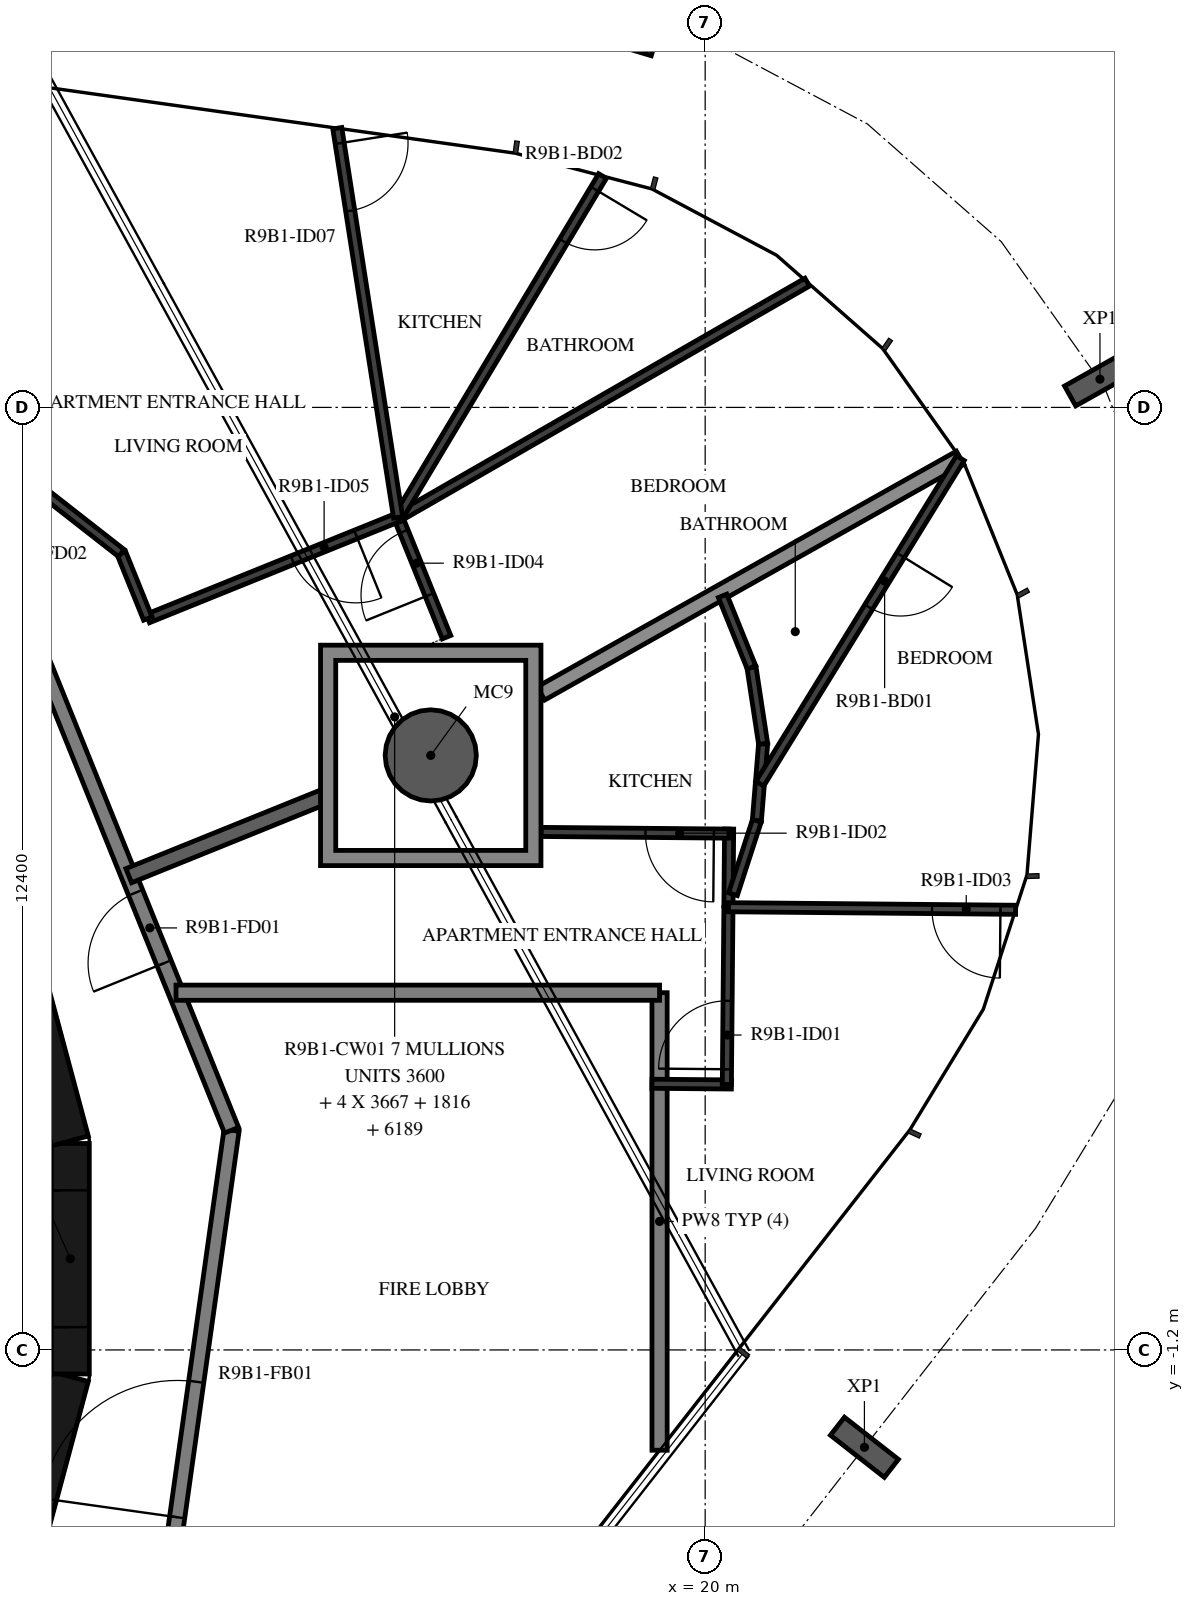
"""IFC4 building model, lengths in metres.
Left out: names, types, materials, properties, quantities, classifications, styles, units other than length and angle.
Written with IfcOpenShell. Run it as: python <this file> out.ifc"""

import sys

from ifc_helpers import new_model, si_unit, direction, frame, frame_2d, origin, origin_2d, place, context, subcontext, project, spatial, polyline, rectangle, hollow_circle, i_section, outline, extrude, element, fill, save


model = new_model("IFC4")
c1 = context("Model", 3, precision=1e-05, world=origin(), true_north=direction((0.0, 1.0)))
c2 = subcontext(c1, "Body", "Model", "MODEL_VIEW")
j1 = project(units=[si_unit("LENGTHUNIT", "METRE"), si_unit("PLANEANGLEUNIT", "RADIAN")], contexts=[c1])
p1 = place(None, origin())
s1 = spatial("IfcSite", under=j1, at=p1, CompositionType="ELEMENT")
p2 = place(p1, origin())
s2 = spatial("IfcBuilding", under=s1, at=p2, CompositionType="ELEMENT")
p3 = place(p2, frame((0.0, 0.0, 350.5)))
s3 = spatial("IfcBuildingStorey", under=s2, at=p3, CompositionType="ELEMENT", Elevation=350.5)
p4 = place(p3, frame((16.39, 6.622, -0.38), z_axis=(0.0, 0.0, 1.0), x_axis=(1.0, 0.0, 0.0)))
e1 = element("IfcColumn", 1, at=p4, inside=s3, PredefinedType="COLUMN", context=c2, shape_type="SweptSolid", body=[
    extrude(hollow_circle(Radius=0.6, WallThickness=0.03, at=origin_2d()), origin(), (0.0, 0.0, 1.0), 3.5),
])
for number, where, z_axis, x_axis in (
    (2, (22.095, -2.481, -0.38), (0.0, 0.0, 1.0), (-0.616, -0.788, 0.0)),
    (3, (25.194, 11.571, -0.38), (0.0, 0.0, 1.0), (0.49, -0.872, 0.0)),
    (4, (19.276, 16.301, -0.38), (0.0, 0.0, 1.0), (0.958, -0.286, 0.0)),
):
    element("IfcColumn", number, at=place(p3, frame(where, z_axis=z_axis, x_axis=x_axis)), inside=s3, PredefinedType="COLUMN", context=c2, shape_type="SweptSolid", body=[
        extrude(i_section(OverallWidth=0.3, OverallDepth=0.9, WebThickness=0.019, FlangeThickness=0.035, FilletRadius=0.03, at=origin_2d()), origin(), (0.0, 0.0, 1.0), 3.5),
    ])
p5 = place(p3, frame((10.858, -4.479, 0.0), z_axis=(0.0, 0.0, 1.0), x_axis=(0.258734743916, 0.965948410781, 0.0)))
e5 = element("IfcWall", 5, at=p5, inside=s3, PredefinedType="SHEAR", context=c2, shape_type="SweptSolid", body=[
    extrude(rectangle(XDim=3.033, YDim=0.5, at=frame_2d((1.516, 0.0))), origin(), (0.0, 0.0, 1.0), 3.12),
])
p6 = place(p3, frame((11.647, -1.516, 0.0), z_axis=(0.0, 0.0, 1.0), x_axis=(0.0, 1.0, 0.0)))
e6 = element("IfcWall", 6, at=p6, inside=s3, PredefinedType="SHEAR", context=c2, shape_type="SweptSolid", body=[
    extrude(rectangle(XDim=3.033, YDim=0.5, at=frame_2d((1.516, 0.0))), origin(), (0.0, 0.0, 1.0), 3.12),
])
p7 = place(p6, frame((0.616, 0.0, 0.0)))
e7 = element("IfcOpeningElement", 7, at=p7, cuts=e6, PredefinedType="OPENING", context=c2, shape_type="SweptSolid", body=[
    extrude(rectangle(XDim=1.8, YDim=2.1, at=frame_2d((0.9, 1.05))), frame((0.0, 0.26, 0.0), z_axis=(0.0, -1.0, 0.0), x_axis=(1.0, 0.0, 0.0)), (0.0, 0.0, 1.0), 0.52),
])
p8 = place(p3, frame((11.643, 1.55, 0.0), z_axis=(0.0, 0.0, 1.0), x_axis=(-0.258734743916, 0.965948410781, 0.0)))
e8 = element("IfcWall", 8, at=p8, inside=s3, PredefinedType="SHEAR", context=c2, shape_type="SweptSolid", body=[
    extrude(rectangle(XDim=3.033, YDim=0.5, at=frame_2d((1.516, 0.0))), origin(), (0.0, 0.0, 1.0), 3.12),
])
p9 = place(p3, frame((12.77, -5.42, 0.0), z_axis=(0.0, 0.0, 1.0), x_axis=(0.139155334385, 0.990270565508, 0.0)))
e9 = element("IfcWall", 9, at=p9, inside=s3, PredefinedType="STANDARD", context=c2, shape_type="SweptSolid", body=[
    extrude(rectangle(XDim=7.181, YDim=0.2, at=frame_2d((3.59, 0.0))), origin(), (0.0, 0.0, 1.0), 3.12),
])
p10 = place(p9, frame((2.039, 0.0, 0.0)))
e10 = element("IfcOpeningElement", 10, at=p10, cuts=e9, PredefinedType="OPENING", context=c2, shape_type="SweptSolid", body=[
    extrude(rectangle(XDim=1.8, YDim=2.1, at=frame_2d((0.9, 1.05))), frame((0.0, 0.11, 0.0), z_axis=(0.0, -1.0, 0.0), x_axis=(1.0, 0.0, 0.0)), (0.0, 0.0, 1.0), 0.22),
])
p11 = place(p3, frame((13.769, 1.691, 0.0), z_axis=(0.0, 0.0, 1.0), x_axis=(-0.374618189599, 0.92717916932, 0.0)))
e11 = element("IfcWall", 11, at=p11, inside=s3, PredefinedType="STANDARD", context=c2, shape_type="SweptSolid", body=[
    extrude(rectangle(XDim=7.181, YDim=0.2, at=frame_2d((3.591, 0.0))), origin(), (0.0, 0.0, 1.0), 3.12),
])
p12 = place(p11, frame((2.371, 0.0, 0.0)))
e12 = element("IfcOpeningElement", 12, at=p12, cuts=e11, PredefinedType="OPENING", context=c2, shape_type="SweptSolid", body=[
    extrude(rectangle(XDim=1.0, YDim=2.1, at=frame_2d((0.5, 1.05))), frame((0.0, 0.11, 0.0), z_axis=(0.0, -1.0, 0.0), x_axis=(1.0, 0.0, 0.0)), (0.0, 0.0, 1.0), 0.22),
])
p13 = place(p3, frame((19.4, -2.519, 0.0), z_axis=(0.0, 0.0, 1.0), x_axis=(0.0, 1.0, 0.0)))
e13 = element("IfcWall", 13, at=p13, inside=s3, PredefinedType="STANDARD", context=c2, shape_type="SweptSolid", body=[
    extrude(rectangle(XDim=6.019, YDim=0.2, at=frame_2d((3.01, 0.0))), origin(), (0.0, 0.0, 1.0), 3.12),
])
p14 = place(p3, frame((19.4, 3.5, 0.0), z_axis=(0.0, 0.0, 1.0), x_axis=(-1.0, 0.0, 0.0)))
e14 = element("IfcWall", 14, at=p14, inside=s3, PredefinedType="STANDARD", context=c2, shape_type="SweptSolid", body=[
    extrude(rectangle(XDim=6.362, YDim=0.2, at=frame_2d((3.181, 0.0))), origin(), (0.0, 0.0, 1.0), 3.12),
])
p15 = place(p3, frame((14.989, 6.079, 0.0), z_axis=(0.0, 0.0, 1.0), x_axis=(-0.927203056473, -0.374559063523, 0.0)))
e15 = element("IfcWall", 15, at=p15, inside=s3, PredefinedType="STANDARD", context=c2, shape_type="SweptSolid", body=[
    extrude(rectangle(XDim=2.775, YDim=0.2, at=frame_2d((1.387, 0.0))), origin(), (0.0, 0.0, 1.0), 3.12),
])
p16 = place(p3, frame((23.354, 10.537, 0.0), z_axis=(0.0, 0.0, 1.0), x_axis=(-0.871719790551, -0.490004700754, 0.0)))
e16 = element("IfcWall", 16, at=p16, inside=s3, PredefinedType="STANDARD", context=c2, shape_type="SweptSolid", body=[
    extrude(rectangle(XDim=6.326, YDim=0.2, at=frame_2d((3.163, 0.0))), origin(), (0.0, 0.0, 1.0), 2.73),
])
p17 = place(p3, frame((19.3, 2.302, 0.0), z_axis=(0.0, 0.0, 1.0), x_axis=(0.999958506341, -0.009109643015, 0.0)))
e17 = element("IfcWall", 17, at=p17, inside=s3, PredefinedType="PARTITIONING", context=c2, shape_type="SweptSolid", body=[
    extrude(rectangle(XDim=1.045, YDim=0.12, at=frame_2d((0.522, 0.0))), origin(), (0.0, 0.0, 1.0), 3.12),
])
p18 = place(p3, frame((20.285, 2.293, 0.0), z_axis=(0.0, 0.0, 1.0), x_axis=(0.008900171034, 0.999960392693, 0.0)))
e18 = element("IfcWall", 18, at=p18, inside=s3, PredefinedType="PARTITIONING", context=c2, shape_type="SweptSolid", body=[
    extrude(rectangle(XDim=2.332, YDim=0.12, at=frame_2d((1.166, 0.0))), origin(), (0.0, 0.0, 1.0), 3.12),
])
p19 = place(p18, frame((0.2, 0.0, 0.0)))
e19 = element("IfcOpeningElement", 19, at=p19, cuts=e18, PredefinedType="OPENING", context=c2, shape_type="SweptSolid", body=[
    extrude(rectangle(XDim=0.9, YDim=2.1, at=frame_2d((0.45, 1.05))), frame((0.0, 0.07, 0.0), z_axis=(0.0, -1.0, 0.0), x_axis=(1.0, 0.0, 0.0)), (0.0, 0.0, 1.0), 0.14),
])
p20 = place(p3, frame((20.306, 4.639, 0.0), z_axis=(0.0, 0.0, 1.0), x_axis=(0.008906724211, 0.999960334345, 0.0)))
e20 = element("IfcWall", 20, at=p20, inside=s3, PredefinedType="PARTITIONING", context=c2, shape_type="SweptSolid", body=[
    extrude(rectangle(XDim=1.014, YDim=0.12, at=frame_2d((0.507, 0.0))), origin(), (0.0, 0.0, 1.0), 3.12),
])
p21 = place(p3, frame((20.315, 5.593, 0.0), z_axis=(0.0, 0.0, 1.0), x_axis=(-0.999960597409, 0.008877140833, 0.0)))
e21 = element("IfcWall", 21, at=p21, inside=s3, PredefinedType="PARTITIONING", context=c2, shape_type="SweptSolid", body=[
    extrude(rectangle(XDim=2.475, YDim=0.12, at=frame_2d((1.238, 0.0))), origin(), (0.0, 0.0, 1.0), 3.12),
])
p22 = place(p21, frame((0.2, 0.0, 0.0)))
e22 = element("IfcOpeningElement", 22, at=p22, cuts=e21, PredefinedType="OPENING", context=c2, shape_type="SweptSolid", body=[
    extrude(rectangle(XDim=0.9, YDim=2.1, at=frame_2d((0.45, 1.05))), frame((0.0, 0.07, 0.0), z_axis=(0.0, -1.0, 0.0), x_axis=(1.0, 0.0, 0.0)), (0.0, 0.0, 1.0), 0.14),
])
p23 = place(p3, frame((24.085, 4.591, 0.0), z_axis=(0.0, 0.0, 1.0), x_axis=(-0.99996025077, 0.008916102255, 0.0)))
e23 = element("IfcWall", 23, at=p23, inside=s3, PredefinedType="PARTITIONING", context=c2, shape_type="SweptSolid", body=[
    extrude(rectangle(XDim=3.779, YDim=0.12, at=frame_2d((1.889, 0.0))), origin(), (0.0, 0.0, 1.0), 2.73),
])
p24 = place(p23, frame((0.2, 0.0, 0.0)))
e24 = element("IfcOpeningElement", 24, at=p24, cuts=e23, PredefinedType="OPENING", context=c2, shape_type="SweptSolid", body=[
    extrude(rectangle(XDim=0.9, YDim=2.1, at=frame_2d((0.45, 1.05))), frame((0.0, 0.07, 0.0), z_axis=(0.0, -1.0, 0.0), x_axis=(1.0, 0.0, 0.0)), (0.0, 0.0, 1.0), 0.14),
])
p25 = place(p3, frame((20.762, 6.775, 0.0), z_axis=(0.0, 0.0, 1.0), x_axis=(-0.08121587, -0.996696534789, 0.0)))
e25 = element("IfcWall", 25, at=p25, inside=s3, PredefinedType="PARTITIONING", context=c2, shape_type="SweptSolid", body=[
    extrude(rectangle(XDim=1.016, YDim=0.12, at=frame_2d((0.508, 0.0))), origin(), (0.0, 0.0, 1.0), 3.12),
])
p26 = place(p3, frame((20.68, 5.762, 0.0), z_axis=(0.0, 0.0, 1.0), x_axis=(-0.30908063779, -0.951035834942, 0.0)))
e26 = element("IfcWall", 26, at=p26, inside=s3, PredefinedType="PARTITIONING", context=c2, shape_type="SweptSolid", body=[
    extrude(rectangle(XDim=1.016, YDim=0.12, at=frame_2d((0.508, 0.0))), origin(), (0.0, 0.0, 1.0), 3.12),
])
p27 = place(p3, frame((23.357, 10.532, 0.0), z_axis=(0.0, 0.0, 1.0), x_axis=(-0.524476563806, -0.851424884542, 0.0)))
e27 = element("IfcWall", 27, at=p27, inside=s3, PredefinedType="PARTITIONING", context=c2, shape_type="SweptSolid", body=[
    extrude(rectangle(XDim=5.029, YDim=0.12, at=frame_2d((2.515, 0.0))), origin(), (0.0, 0.0, 1.0), 3.12),
])
p28 = place(p27, frame((1.5, 0.0, 0.0)))
e28 = element("IfcOpeningElement", 28, at=p28, cuts=e27, PredefinedType="OPENING", context=c2, shape_type="SweptSolid", body=[
    extrude(rectangle(XDim=0.8, YDim=2.1, at=frame_2d((0.4, 1.05))), frame((0.0, 0.07, 0.0), z_axis=(0.0, -1.0, 0.0), x_axis=(1.0, 0.0, 0.0)), (0.0, 0.0, 1.0), 0.14),
])
p29 = place(p3, frame((20.762, 6.775, 0.0), z_axis=(0.0, 0.0, 1.0), x_axis=(-0.150702440861, 0.988579169474, 0.0)))
e29 = element("IfcWall", 29, at=p29, inside=s3, PredefinedType="PARTITIONING", context=c2, shape_type="SweptSolid", body=[
    extrude(rectangle(XDim=1.016, YDim=0.12, at=frame_2d((0.508, 0.0))), origin(), (0.0, 0.0, 1.0), 3.12),
])
p30 = place(p3, frame((20.609, 7.779, 0.0), z_axis=(0.0, 0.0, 1.0), x_axis=(-0.374371668856, 0.927278735633, 0.0)))
e30 = element("IfcWall", 30, at=p30, inside=s3, PredefinedType="PARTITIONING", context=c2, shape_type="SweptSolid", body=[
    extrude(rectangle(XDim=1.016, YDim=0.12, at=frame_2d((0.508, 0.0))), origin(), (0.0, 0.0, 1.0), 3.12),
])
p31 = place(p3, frame((16.597, 8.177, 0.0), z_axis=(0.0, 0.0, 1.0), x_axis=(-0.374631609957, 0.927173746835, 0.0)))
e31 = element("IfcWall", 31, at=p31, inside=s3, PredefinedType="PARTITIONING", context=c2, shape_type="SweptSolid", body=[
    extrude(rectangle(XDim=1.7, YDim=0.12, at=frame_2d((0.85, 0.0))), origin(), (0.0, 0.0, 1.0), 3.12),
])
p32 = place(p31, frame((0.6, 0.0, 0.0)))
e32 = element("IfcOpeningElement", 32, at=p32, cuts=e31, PredefinedType="OPENING", context=c2, shape_type="SweptSolid", body=[
    extrude(rectangle(XDim=0.9, YDim=2.1, at=frame_2d((0.45, 1.05))), frame((0.0, 0.07, 0.0), z_axis=(0.0, -1.0, 0.0), x_axis=(1.0, 0.0, 0.0)), (0.0, 0.0, 1.0), 0.14),
])
p33 = place(p3, frame((15.96, 9.753, 0.0), z_axis=(0.0, 0.0, 1.0), x_axis=(-0.927148174805, -0.37469489182, 0.0)))
e33 = element("IfcWall", 33, at=p33, inside=s3, PredefinedType="PARTITIONING", context=c2, shape_type="SweptSolid", body=[
    extrude(rectangle(XDim=3.552, YDim=0.12, at=frame_2d((1.776, 0.0))), origin(), (0.0, 0.0, 1.0), 3.12),
])
p34 = place(p33, frame((0.6, 0.0, 0.0)))
e34 = element("IfcOpeningElement", 34, at=p34, cuts=e33, PredefinedType="OPENING", context=c2, shape_type="SweptSolid", body=[
    extrude(rectangle(XDim=0.9, YDim=2.1, at=frame_2d((0.45, 1.05))), frame((0.0, 0.07, 0.0), z_axis=(0.0, -1.0, 0.0), x_axis=(1.0, 0.0, 0.0)), (0.0, 0.0, 1.0), 0.14),
])
p35 = place(p3, frame((12.667, 8.423, 0.0), z_axis=(0.0, 0.0, 1.0), x_axis=(-0.374697807675, 0.927146996395, 0.0)))
e35 = element("IfcWall", 35, at=p35, inside=s3, PredefinedType="PARTITIONING", context=c2, shape_type="SweptSolid", body=[
    extrude(rectangle(XDim=0.928, YDim=0.12, at=frame_2d((0.464, 0.0))), origin(), (0.0, 0.0, 1.0), 3.12),
])
p36 = place(p3, frame((12.319, 9.283, 0.0), z_axis=(0.0, 0.0, 1.0), x_axis=(-0.788000268464, 0.61567489546, 0.0)))
e36 = element("IfcWall", 36, at=p36, inside=s3, PredefinedType="PARTITIONING", context=c2, shape_type="SweptSolid", body=[
    extrude(rectangle(XDim=7.985, YDim=0.12, at=frame_2d((3.992, 0.0))), origin(), (0.0, 0.0, 1.0), 3.12),
])
p37 = place(p36, frame((4.765, 0.0, 0.0)))
e37 = element("IfcOpeningElement", 37, at=p37, cuts=e36, PredefinedType="OPENING", context=c2, shape_type="SweptSolid", body=[
    extrude(rectangle(XDim=0.9, YDim=2.1, at=frame_2d((0.45, 1.05))), frame((0.0, 0.07, 0.0), z_axis=(0.0, -1.0, 0.0), x_axis=(1.0, 0.0, 0.0)), (0.0, 0.0, 1.0), 0.14),
])
p38 = place(p3, frame((21.343, 12.847, 0.0), z_axis=(0.0, 0.0, 1.0), x_axis=(-0.866974691568, -0.498352168832, 0.0)))
e38 = element("IfcWall", 38, at=p38, inside=s3, PredefinedType="PARTITIONING", context=c2, shape_type="SweptSolid", body=[
    extrude(rectangle(XDim=6.208, YDim=0.12, at=frame_2d((3.104, 0.0))), origin(), (0.0, 0.0, 1.0), 3.12),
])
p39 = place(p3, frame((18.649, 14.244, 0.0), z_axis=(0.0, 0.0, 1.0), x_axis=(-0.513782200586, -0.85792065505, 0.0)))
e39 = element("IfcWall", 39, at=p39, inside=s3, PredefinedType="PARTITIONING", context=c2, shape_type="SweptSolid", body=[
    extrude(rectangle(XDim=5.234, YDim=0.12, at=frame_2d((2.617, 0.0))), origin(), (0.0, 0.0, 1.0), 3.12),
])
p40 = place(p39, frame((0.2, 0.0, 0.0)))
e40 = element("IfcOpeningElement", 40, at=p40, cuts=e39, PredefinedType="OPENING", context=c2, shape_type="SweptSolid", body=[
    extrude(rectangle(XDim=0.8, YDim=2.1, at=frame_2d((0.4, 1.05))), frame((0.0, 0.07, 0.0), z_axis=(0.0, -1.0, 0.0), x_axis=(1.0, 0.0, 0.0)), (0.0, 0.0, 1.0), 0.14),
])
p41 = place(p3, frame((15.16, 14.873, 0.0), z_axis=(0.0, 0.0, 1.0), x_axis=(0.154389815045, -0.988010012606, 0.0)))
e41 = element("IfcWall", 41, at=p41, inside=s3, PredefinedType="PARTITIONING", context=c2, shape_type="SweptSolid", body=[
    extrude(rectangle(XDim=5.182, YDim=0.12, at=frame_2d((2.591, 0.0))), origin(), (0.0, 0.0, 1.0), 3.12),
])
p42 = place(p41, frame((0.2, 0.0, 0.0)))
e42 = element("IfcOpeningElement", 42, at=p42, cuts=e41, PredefinedType="OPENING", context=c2, shape_type="SweptSolid", body=[
    extrude(rectangle(XDim=0.9, YDim=2.1, at=frame_2d((0.45, 1.05))), frame((0.0, 0.07, 0.0), z_axis=(0.0, -1.0, 0.0), x_axis=(1.0, 0.0, 0.0)), (0.0, 0.0, 1.0), 0.14),
])
p43 = place(p3, origin())
e43 = element("IfcWall", 43, at=p43, inside=s3, PredefinedType="STANDARD", context=c2, shape_type="SweptSolid", body=[
    extrude(outline(polyline([(17.84, 8.072), (17.84, 5.172), (14.94, 5.172), (14.94, 8.072), (17.84, 8.072)]), holes=[polyline([(15.14, 5.372), (17.64, 5.372), (17.64, 7.872), (15.14, 7.872), (15.14, 5.372)])]), origin(), (0.0, 0.0, 1.0), 3.12),
])
p44 = place(p7, origin())
e44 = element("IfcDoor", 44, at=p44, inside=s3, OperationType="DOUBLE_DOOR_SINGLE_SWING", PredefinedType="DOOR", context=c2, shape_type="SweptSolid", body=[
    extrude(rectangle(XDim=1.8, YDim=2.1, at=frame_2d((0.9, 1.05))), frame((0.0, 0.025, 0.0), z_axis=(0.0, -1.0, 0.0), x_axis=(1.0, 0.0, 0.0)), (0.0, 0.0, 1.0), 0.05),
])
fill(e7, e44)
p45 = place(p12, origin())
e45 = element("IfcDoor", 45, at=p45, inside=s3, OperationType="SINGLE_SWING_LEFT", PredefinedType="DOOR", context=c2, shape_type="SweptSolid", body=[
    extrude(rectangle(XDim=1.0, YDim=2.1, at=frame_2d((0.5, 1.05))), frame((0.0, 0.025, 0.0), z_axis=(0.0, -1.0, 0.0), x_axis=(1.0, 0.0, 0.0)), (0.0, 0.0, 1.0), 0.05),
])
fill(e12, e45)
p46 = place(p19, origin())
e46 = element("IfcDoor", 46, at=p46, inside=s3, OperationType="SINGLE_SWING_RIGHT", PredefinedType="DOOR", context=c2, shape_type="SweptSolid", body=[
    extrude(rectangle(XDim=0.9, YDim=2.1, at=frame_2d((0.45, 1.05))), frame((0.0, 0.025, 0.0), z_axis=(0.0, -1.0, 0.0), x_axis=(1.0, 0.0, 0.0)), (0.0, 0.0, 1.0), 0.05),
])
fill(e19, e46)
p47 = place(p22, origin())
e47 = element("IfcDoor", 47, at=p47, inside=s3, OperationType="SINGLE_SWING_RIGHT", PredefinedType="DOOR", context=c2, shape_type="SweptSolid", body=[
    extrude(rectangle(XDim=0.9, YDim=2.1, at=frame_2d((0.45, 1.05))), frame((0.0, 0.025, 0.0), z_axis=(0.0, -1.0, 0.0), x_axis=(1.0, 0.0, 0.0)), (0.0, 0.0, 1.0), 0.05),
])
fill(e22, e47)
p48 = place(p24, origin())
e48 = element("IfcDoor", 48, at=p48, inside=s3, OperationType="SINGLE_SWING_RIGHT", PredefinedType="DOOR", context=c2, shape_type="SweptSolid", body=[
    extrude(rectangle(XDim=0.9, YDim=2.1, at=frame_2d((0.45, 1.05))), frame((0.0, 0.025, 0.0), z_axis=(0.0, -1.0, 0.0), x_axis=(1.0, 0.0, 0.0)), (0.0, 0.0, 1.0), 0.05),
])
fill(e24, e48)
p49 = place(p28, origin())
e49 = element("IfcDoor", 49, at=p49, inside=s3, OperationType="SINGLE_SWING_RIGHT", PredefinedType="DOOR", context=c2, shape_type="SweptSolid", body=[
    extrude(rectangle(XDim=0.8, YDim=2.1, at=frame_2d((0.4, 1.05))), frame((0.0, 0.025, 0.0), z_axis=(0.0, -1.0, 0.0), x_axis=(1.0, 0.0, 0.0)), (0.0, 0.0, 1.0), 0.05),
])
fill(e28, e49)
p50 = place(p32, origin())
e50 = element("IfcDoor", 50, at=p50, inside=s3, OperationType="SINGLE_SWING_LEFT", PredefinedType="DOOR", context=c2, shape_type="SweptSolid", body=[
    extrude(rectangle(XDim=0.9, YDim=2.1, at=frame_2d((0.45, 1.05))), frame((0.0, 0.025, 0.0), z_axis=(0.0, -1.0, 0.0), x_axis=(1.0, 0.0, 0.0)), (0.0, 0.0, 1.0), 0.05),
])
fill(e32, e50)
p51 = place(p34, origin())
e51 = element("IfcDoor", 51, at=p51, inside=s3, OperationType="SINGLE_SWING_RIGHT", PredefinedType="DOOR", context=c2, shape_type="SweptSolid", body=[
    extrude(rectangle(XDim=0.9, YDim=2.1, at=frame_2d((0.45, 1.05))), frame((0.0, 0.025, 0.0), z_axis=(0.0, -1.0, 0.0), x_axis=(1.0, 0.0, 0.0)), (0.0, 0.0, 1.0), 0.05),
])
fill(e34, e51)
p52 = place(p42, origin())
e52 = element("IfcDoor", 52, at=p52, inside=s3, OperationType="SINGLE_SWING_LEFT", PredefinedType="DOOR", context=c2, shape_type="SweptSolid", body=[
    extrude(rectangle(XDim=0.9, YDim=2.1, at=frame_2d((0.45, 1.05))), frame((0.0, 0.025, 0.0), z_axis=(0.0, -1.0, 0.0), x_axis=(1.0, 0.0, 0.0)), (0.0, 0.0, 1.0), 0.05),
])
fill(e42, e52)
p53 = place(p40, origin())
e53 = element("IfcDoor", 53, at=p53, inside=s3, OperationType="SINGLE_SWING_LEFT", PredefinedType="DOOR", context=c2, shape_type="SweptSolid", body=[
    extrude(rectangle(XDim=0.8, YDim=2.1, at=frame_2d((0.4, 1.05))), frame((0.0, 0.025, 0.0), z_axis=(0.0, -1.0, 0.0), x_axis=(1.0, 0.0, 0.0)), (0.0, 0.0, 1.0), 0.05),
])
fill(e40, e53)
p54 = place(p10, origin())
e54 = element("IfcDoor", 54, at=p54, inside=s3, OperationType="DOUBLE_DOOR_SINGLE_SWING", PredefinedType="DOOR", context=c2, shape_type="SweptSolid", body=[
    extrude(rectangle(XDim=1.8, YDim=2.1, at=frame_2d((0.9, 1.05))), frame((0.0, 0.025, 0.0), z_axis=(0.0, -1.0, 0.0), x_axis=(1.0, 0.0, 0.0)), (0.0, 0.0, 1.0), 0.05),
])
fill(e10, e54)
save(model, sys.argv[1])
